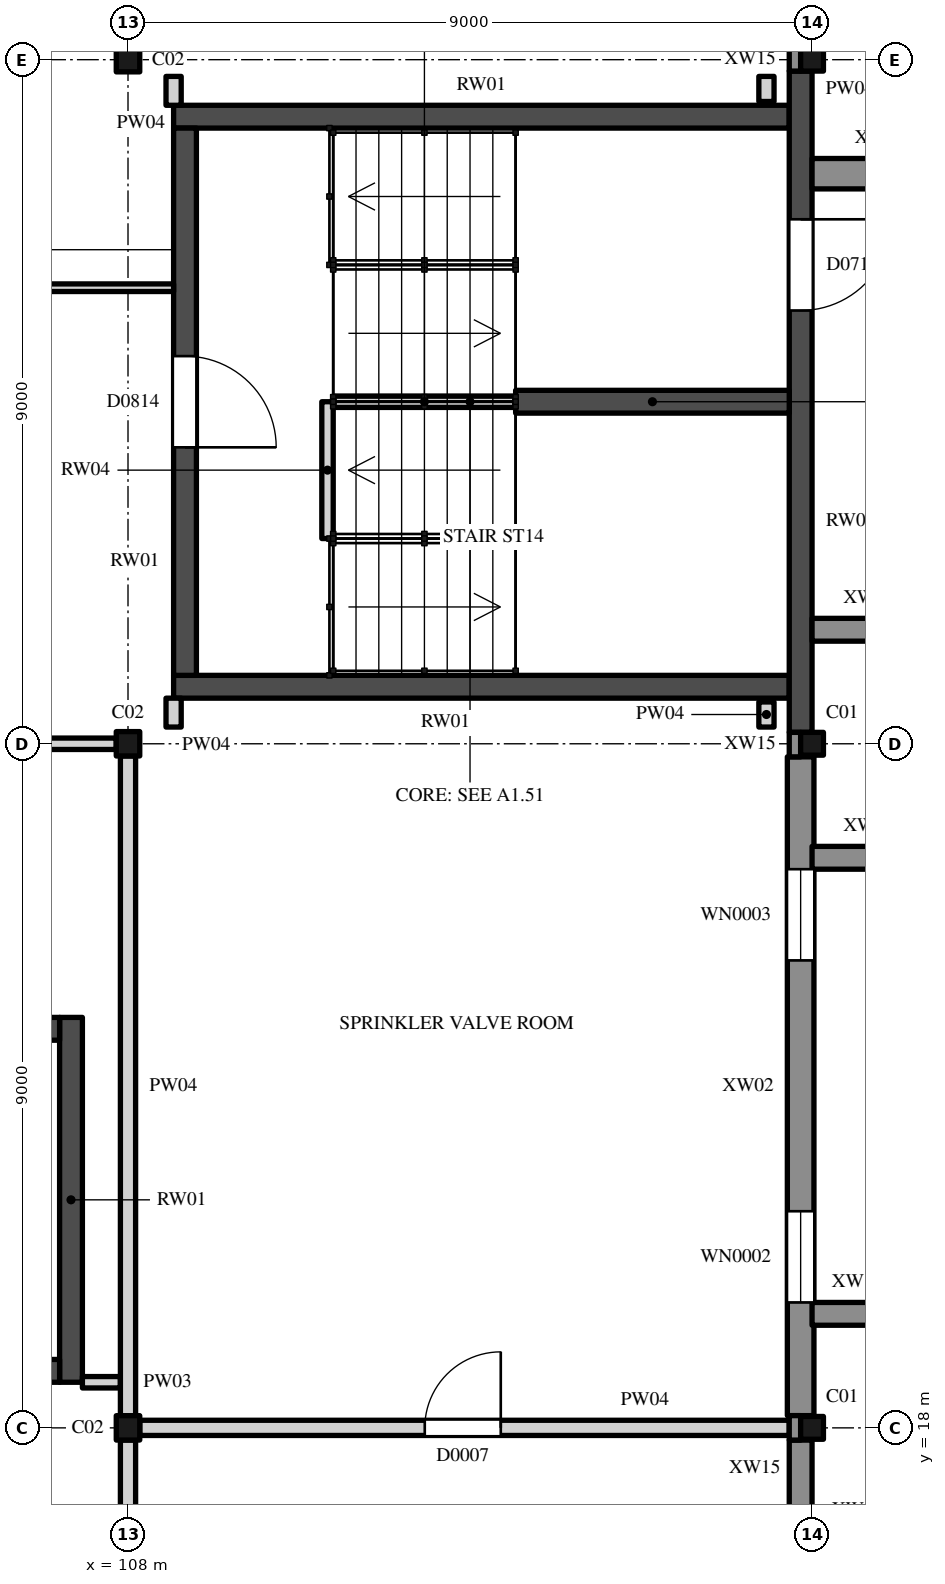
"""IFC4 building model, lengths in metres.
Left out: names, types, materials, properties, quantities, classifications, styles, units other than length and angle.
Written with IfcOpenShell. Run it as: python <this file> out.ifc"""

import sys

from ifc_helpers import new_model, si_unit, direction, frame, frame_2d, origin, origin_2d, place, context, subcontext, project, spatial, polyline, rectangle, hollow_rectangle, i_section, outline, extrude, element, fill, save


model = new_model("IFC4")
c1 = context("Model", 3, precision=1e-05, world=origin(), true_north=direction((0.0, 1.0)))
c2 = subcontext(c1, "Body", "Model", "MODEL_VIEW")
j1 = project(units=[si_unit("LENGTHUNIT", "METRE"), si_unit("PLANEANGLEUNIT", "RADIAN")], contexts=[c1])
p1 = place(None, origin())
s1 = spatial("IfcSite", under=j1, at=p1, CompositionType="ELEMENT")
p2 = place(p1, origin())
s2 = spatial("IfcBuilding", under=s1, at=p2, CompositionType="ELEMENT")
p3 = place(p2, origin())
s3 = spatial("IfcBuildingStorey", under=s2, at=p3, CompositionType="ELEMENT", Elevation=0.0)
p4 = place(p3, frame((108.0, 18.0, 0.0), z_axis=(0.0, 0.0, 1.0), x_axis=(1.0, 0.0, 0.0)))
e1 = element("IfcColumn", 1, at=p4, inside=s3, PredefinedType="COLUMN", context=c2, shape_type="SweptSolid", body=[
    extrude(i_section(OverallWidth=0.309, OverallDepth=0.321, WebThickness=0.014, FlangeThickness=0.022, FilletRadius=0.017, at=origin_2d()), origin(), (0.0, 0.0, 1.0), 6.0),
])
p5 = place(p3, frame((117.0, 18.0, 0.0), z_axis=(0.0, 0.0, 1.0), x_axis=(1.0, 0.0, 0.0)))
e2 = element("IfcColumn", 2, at=p5, inside=s3, PredefinedType="COLUMN", context=c2, shape_type="SweptSolid", body=[
    extrude(hollow_rectangle(XDim=0.3, YDim=0.3, WallThickness=0.012, InnerFilletRadius=0.019, OuterFilletRadius=0.031, at=origin_2d()), origin(), (0.0, 0.0, 1.0), 6.0),
])
p6 = place(p3, frame((108.0, 27.0, 0.0), z_axis=(0.0, 0.0, 1.0), x_axis=(1.0, 0.0, 0.0)))
e3 = element("IfcColumn", 3, at=p6, inside=s3, PredefinedType="COLUMN", context=c2, shape_type="SweptSolid", body=[
    extrude(i_section(OverallWidth=0.309, OverallDepth=0.321, WebThickness=0.014, FlangeThickness=0.022, FilletRadius=0.017, at=origin_2d()), origin(), (0.0, 0.0, 1.0), 6.0),
])
p7 = place(p3, frame((117.0, 27.0, 0.0), z_axis=(0.0, 0.0, 1.0), x_axis=(1.0, 0.0, 0.0)))
e4 = element("IfcColumn", 4, at=p7, inside=s3, PredefinedType="COLUMN", context=c2, shape_type="SweptSolid", body=[
    extrude(hollow_rectangle(XDim=0.3, YDim=0.3, WallThickness=0.012, InnerFilletRadius=0.019, OuterFilletRadius=0.031, at=origin_2d()), origin(), (0.0, 0.0, 1.0), 6.0),
])
p8 = place(p3, frame((108.0, 36.0, 0.0), z_axis=(0.0, 0.0, 1.0), x_axis=(1.0, 0.0, 0.0)))
e5 = element("IfcColumn", 5, at=p8, inside=s3, PredefinedType="COLUMN", context=c2, shape_type="SweptSolid", body=[
    extrude(i_section(OverallWidth=0.309, OverallDepth=0.321, WebThickness=0.014, FlangeThickness=0.022, FilletRadius=0.017, at=origin_2d()), origin(), (0.0, 0.0, 1.0), 6.0),
])
p9 = place(p3, frame((117.0, 36.0, 0.0), z_axis=(0.0, 0.0, 1.0), x_axis=(1.0, 0.0, 0.0)))
e6 = element("IfcColumn", 6, at=p9, inside=s3, PredefinedType="COLUMN", context=c2, shape_type="SweptSolid", body=[
    extrude(hollow_rectangle(XDim=0.3, YDim=0.3, WallThickness=0.012, InnerFilletRadius=0.019, OuterFilletRadius=0.031, at=origin_2d()), origin(), (0.0, 0.0, 1.0), 6.0),
])
for number, where, z_axis, x_axis in (
    (7, (108.6, 27.75, 0.0), (0.0, 0.0, 1.0), (1.0, 0.0, 0.0)),
    (8, (108.6, 35.25, 0.0), (0.0, 0.0, 1.0), (1.0, 0.0, 0.0)),
):
    element("IfcWall", number, at=place(p3, frame(where, z_axis=z_axis, x_axis=x_axis)), inside=s3, PredefinedType="SHEAR", context=c2, shape_type="SweptSolid", body=[
        extrude(rectangle(XDim=8.1, YDim=0.3, at=frame_2d((4.05, 0.0))), origin(), (0.0, 0.0, 1.0), 6.0),
    ])
p10 = place(p3, frame((108.75, 27.9, 0.0), z_axis=(0.0, 0.0, 1.0), x_axis=(0.0, 1.0, 0.0)))
e9 = element("IfcWall", 9, at=p10, inside=s3, PredefinedType="SHEAR", context=c2, shape_type="SweptSolid", body=[
    extrude(rectangle(XDim=7.2, YDim=0.3, at=frame_2d((3.6, 0.0))), origin(), (0.0, 0.0, 1.0), 6.0),
])
p11 = place(p10, frame((3.0, 0.0, 0.0)))
e10 = element("IfcOpeningElement", 10, at=p11, cuts=e9, PredefinedType="OPENING", context=c2, shape_type="SweptSolid", body=[
    extrude(rectangle(XDim=1.2, YDim=2.1, at=frame_2d((0.6, 1.05))), frame((0.0, 0.16, 0.0), z_axis=(0.0, -1.0, 0.0), x_axis=(1.0, 0.0, 0.0)), (0.0, 0.0, 1.0), 0.32),
])
p12 = place(p3, frame((116.85, 27.15, 0.0), z_axis=(0.0, 0.0, 1.0), x_axis=(0.0, 1.0, 0.0)))
e11 = element("IfcWall", 11, at=p12, inside=s3, PredefinedType="SHEAR", context=c2, shape_type="SweptSolid", body=[
    extrude(rectangle(XDim=8.7, YDim=0.3, at=frame_2d((4.35, 0.0))), origin(), (0.0, 0.0, 1.0), 6.0),
])
p13 = place(p12, frame((5.55, 0.0, 0.0)))
e12 = element("IfcOpeningElement", 12, at=p13, cuts=e11, PredefinedType="OPENING", context=c2, shape_type="SweptSolid", body=[
    extrude(rectangle(XDim=1.2, YDim=2.1, at=frame_2d((0.6, 1.05))), frame((0.0, 0.16, 0.0), z_axis=(0.0, -1.0, 0.0), x_axis=(1.0, 0.0, 0.0)), (0.0, 0.0, 1.0), 0.32),
])
p14 = place(p3, frame((113.1, 31.5, 0.0), z_axis=(0.0, 0.0, 1.0), x_axis=(1.0, 0.0, 0.0)))
e13 = element("IfcWall", 13, at=p14, inside=s3, PredefinedType="SHEAR", context=c2, shape_type="SweptSolid", body=[
    extrude(rectangle(XDim=3.6, YDim=0.3, at=frame_2d((1.8, 0.0))), origin(), (0.0, 0.0, 1.0), 6.0),
])
p15 = place(p3, frame((110.625, 29.7, 0.0), z_axis=(0.0, 0.0, 1.0), x_axis=(0.0, 1.0, 0.0)))
e14 = element("IfcWall", 14, at=p15, inside=s3, PredefinedType="STANDARD", context=c2, shape_type="SweptSolid", body=[
    extrude(rectangle(XDim=1.8, YDim=0.15, at=frame_2d((0.9, 0.0))), origin(), (0.0, 0.0, 1.0), 2.8),
])
p16 = place(p3, frame((110.7, 31.5, 0.0), z_axis=(0.0, 0.0, 1.0), x_axis=(1.0, 0.0, 0.0)))
e15 = element("IfcWall", 15, at=p16, inside=s3, PredefinedType="STANDARD", context=c2, shape_type="SweptSolid", body=[
    extrude(outline(polyline([(0.0, 0.0), (2.4, 0.0), (2.4, 1.5), (2.091, 1.5), (0.0, 2.662), (0.0, 0.0)])), frame((0.0, 0.075, 0.0), z_axis=(0.0, -1.0, 0.0), x_axis=(1.0, 0.0, 0.0)), (0.0, 0.0, 1.0), 0.15),
])
p17 = place(p3, frame((107.25, 18.6, -1.5), z_axis=(0.0, 0.0, 1.0), x_axis=(0.0, 1.0, 0.0)))
e16 = element("IfcWall", 16, at=p17, inside=s3, PredefinedType="SHEAR", context=c2, shape_type="SweptSolid", body=[
    extrude(rectangle(XDim=4.8, YDim=0.3, at=frame_2d((2.4, 0.0))), origin(), (0.0, 0.0, 1.0), 7.5),
])
p18 = place(p3, frame((103.65, 18.75, -1.5), z_axis=(0.0, 0.0, 1.0), x_axis=(1.0, 0.0, 0.0)))
e17 = element("IfcWall", 17, at=p18, inside=s3, PredefinedType="SHEAR", context=c2, shape_type="SweptSolid", body=[
    extrude(rectangle(XDim=3.45, YDim=0.3, at=frame_2d((1.725, 0.0))), origin(), (0.0, 0.0, 1.0), 7.5),
])
p19 = place(p18, frame((0.75, 0.0, 1.5)))
e18 = element("IfcOpeningElement", 18, at=p19, cuts=e17, PredefinedType="OPENING", context=c2, shape_type="SweptSolid", body=[
    extrude(rectangle(XDim=2.1, YDim=2.4, at=frame_2d((1.05, 1.2))), frame((0.0, 0.16, 0.0), z_axis=(0.0, -1.0, 0.0), x_axis=(1.0, 0.0, 0.0)), (0.0, 0.0, 1.0), 0.32),
])
p20 = place(p3, frame((103.65, 23.25, -1.5), z_axis=(0.0, 0.0, 1.0), x_axis=(1.0, 0.0, 0.0)))
e19 = element("IfcWall", 19, at=p20, inside=s3, PredefinedType="SHEAR", context=c2, shape_type="SweptSolid", body=[
    extrude(rectangle(XDim=3.45, YDim=0.3, at=frame_2d((1.725, 0.0))), origin(), (0.0, 0.0, 1.0), 7.5),
])
p21 = place(p3, frame((116.85, 9.172, 0.0), z_axis=(0.0, 0.0, 1.0), x_axis=(0.0, 1.0, 0.0)))
e20 = element("IfcWall", 20, at=p21, inside=s3, PredefinedType="SOLIDWALL", context=c2, shape_type="SweptSolid", body=[
    extrude(rectangle(XDim=8.667, YDim=0.3, at=frame_2d((4.333, 0.0))), origin(), (0.0, 0.0, 1.0), 5.292),
])
p22 = place(p21, frame((3.128, 0.0, 0.9)))
e21 = element("IfcOpeningElement", 21, at=p22, cuts=e20, PredefinedType="OPENING", context=c2, shape_type="SweptSolid", body=[
    extrude(rectangle(XDim=2.4, YDim=1.8, at=frame_2d((1.2, 0.9))), frame((0.0, 0.16, 0.0), z_axis=(0.0, -1.0, 0.0), x_axis=(1.0, 0.0, 0.0)), (0.0, 0.0, 1.0), 0.32),
])
p23 = place(p3, frame((116.85, 18.161, 0.0), z_axis=(0.0, 0.0, 1.0), x_axis=(0.0, 1.0, 0.0)))
e22 = element("IfcWall", 22, at=p23, inside=s3, PredefinedType="SOLIDWALL", context=c2, shape_type="SweptSolid", body=[
    extrude(rectangle(XDim=8.667, YDim=0.35, at=frame_2d((4.333, 0.0))), origin(), (0.0, 0.0, 1.0), 5.292),
])
p24 = place(p23, frame((1.489, 0.0, 1.2)))
e23 = element("IfcOpeningElement", 23, at=p24, cuts=e22, PredefinedType="OPENING", context=c2, shape_type="SweptSolid", body=[
    extrude(rectangle(XDim=1.2, YDim=1.5, at=frame_2d((0.6, 0.75))), frame((0.0, 0.185, 0.0), z_axis=(0.0, -1.0, 0.0), x_axis=(1.0, 0.0, 0.0)), (0.0, 0.0, 1.0), 0.37),
])
p25 = place(p23, frame((5.989, 0.0, 1.2)))
e24 = element("IfcOpeningElement", 24, at=p25, cuts=e22, PredefinedType="OPENING", context=c2, shape_type="SweptSolid", body=[
    extrude(rectangle(XDim=1.2, YDim=1.5, at=frame_2d((0.6, 0.75))), frame((0.0, 0.185, 0.0), z_axis=(0.0, -1.0, 0.0), x_axis=(1.0, 0.0, 0.0)), (0.0, 0.0, 1.0), 0.37),
])
p26 = place(p3, frame((116.775, 17.839, 0.0), z_axis=(0.0, 0.0, 1.0), x_axis=(0.0, 1.0, 0.0)))
e25 = element("IfcWall", 25, at=p26, inside=s3, PredefinedType="SOLIDWALL", context=c2, shape_type="SweptSolid", body=[
    extrude(rectangle(XDim=0.322, YDim=0.15, at=frame_2d((0.161, 0.0))), origin(), (0.0, 0.0, 1.0), 5.292),
])
for number, where, z_axis, x_axis in (
    (26, (116.775, 26.828, 0.0), (0.0, 0.0, 1.0), (0.0, 1.0, 0.0)),
    (27, (116.775, 35.85, 0.0), (0.0, 0.0, 1.0), (0.0, 1.0, 0.0)),
):
    element("IfcWall", number, at=place(p3, frame(where, z_axis=z_axis, x_axis=x_axis)), inside=s3, PredefinedType="SOLIDWALL", context=c2, shape_type="SweptSolid", body=[
        extrude(rectangle(XDim=0.322, YDim=0.15, at=frame_2d((0.161, 0.0))), origin(), (0.0, 0.0, 1.0), 6.0),
    ])
p27 = place(p3, frame((117.0, 19.5, 0.0), z_axis=(0.0, 0.0, 1.0), x_axis=(1.0, 0.0, 0.0)))
e28 = element("IfcWall", 28, at=p27, inside=s3, PredefinedType="SOLIDWALL", context=c2, shape_type="SweptSolid", body=[
    extrude(outline(polyline([(0.0, 0.0), (1.2, 0.0), (1.2, 1.2), (0.0, 4.5), (0.0, 0.0)])), frame((0.0, 0.15, 0.0), z_axis=(0.0, -1.0, 0.0), x_axis=(1.0, 0.0, 0.0)), (0.0, 0.0, 1.0), 0.3),
])
p28 = place(p3, frame((117.0, 25.5, 0.0), z_axis=(0.0, 0.0, 1.0), x_axis=(1.0, 0.0, 0.0)))
e29 = element("IfcWall", 29, at=p28, inside=s3, PredefinedType="SOLIDWALL", context=c2, shape_type="SweptSolid", body=[
    extrude(outline(polyline([(0.0, 0.0), (1.5, 0.0), (1.5, 1.2), (0.0, 5.0), (0.0, 0.0)])), frame((0.0, 0.15, 0.0), z_axis=(0.0, -1.0, 0.0), x_axis=(1.0, 0.0, 0.0)), (0.0, 0.0, 1.0), 0.3),
])
p29 = place(p3, frame((117.0, 28.5, 0.0), z_axis=(0.0, 0.0, 1.0), x_axis=(1.0, 0.0, 0.0)))
e30 = element("IfcWall", 30, at=p29, inside=s3, PredefinedType="SOLIDWALL", context=c2, shape_type="SweptSolid", body=[
    extrude(outline(polyline([(0.0, 0.0), (1.5, 0.0), (1.5, 1.2), (0.0, 5.5), (0.0, 0.0)])), frame((0.0, 0.15, 0.0), z_axis=(0.0, -1.0, 0.0), x_axis=(1.0, 0.0, 0.0)), (0.0, 0.0, 1.0), 0.3),
])
p30 = place(p3, frame((117.0, 34.5, 0.0), z_axis=(0.0, 0.0, 1.0), x_axis=(1.0, 0.0, 0.0)))
e31 = element("IfcWall", 31, at=p30, inside=s3, PredefinedType="SOLIDWALL", context=c2, shape_type="SweptSolid", body=[
    extrude(outline(polyline([(0.0, 0.0), (1.8, 0.0), (1.8, 1.2), (0.0, 6.0), (0.0, 0.0)])), frame((0.0, 0.2, 0.0), z_axis=(0.0, -1.0, 0.0), x_axis=(1.0, 0.0, 0.0)), (0.0, 0.0, 1.0), 0.4),
])
p31 = place(p3, frame((108.155, 18.0, 0.0), z_axis=(0.0, 0.0, 1.0), x_axis=(1.0, 0.0, 0.0)))
e32 = element("IfcWall", 32, at=p31, inside=s3, PredefinedType="PARTITIONING", context=c2, shape_type="SweptSolid", body=[
    extrude(rectangle(XDim=8.545, YDim=0.2, at=frame_2d((4.273, 0.0))), origin(), (0.0, 0.0, 1.0), 5.419),
])
p32 = place(p31, frame((3.75, 0.0, 0.0)))
e33 = element("IfcOpeningElement", 33, at=p32, cuts=e32, PredefinedType="OPENING", context=c2, shape_type="SweptSolid", body=[
    extrude(rectangle(XDim=1.0, YDim=2.1, at=frame_2d((0.5, 1.05))), frame((0.0, 0.11, 0.0), z_axis=(0.0, -1.0, 0.0), x_axis=(1.0, 0.0, 0.0)), (0.0, 0.0, 1.0), 0.22),
])
p33 = place(p3, frame((107.4, 18.6, 0.0), z_axis=(0.0, 0.0, 1.0), x_axis=(1.0, 0.0, 0.0)))
e34 = element("IfcWall", 34, at=p33, inside=s3, PredefinedType="PARTITIONING", context=c2, shape_type="SweptSolid", body=[
    extrude(rectangle(XDim=0.5, YDim=0.15, at=frame_2d((0.25, 0.0))), origin(), (0.0, 0.0, 1.0), 5.825),
])
p34 = place(p3, frame((99.155, 27.0, 0.0), z_axis=(0.0, 0.0, 1.0), x_axis=(1.0, 0.0, 0.0)))
e35 = element("IfcWall", 35, at=p34, inside=s3, PredefinedType="PARTITIONING", context=c2, shape_type="SweptSolid", body=[
    extrude(rectangle(XDim=8.691, YDim=0.15, at=frame_2d((4.345, 0.0))), origin(), (0.0, 0.0, 1.0), 5.419),
])
p35 = place(p34, frame((3.75, 0.0, 0.0)))
e36 = element("IfcOpeningElement", 36, at=p35, cuts=e35, PredefinedType="OPENING", context=c2, shape_type="SweptSolid", body=[
    extrude(rectangle(XDim=1.2, YDim=2.4, at=frame_2d((0.6, 1.2))), frame((0.0, 0.085, 0.0), z_axis=(0.0, -1.0, 0.0), x_axis=(1.0, 0.0, 0.0)), (0.0, 0.0, 1.0), 0.17),
])
p36 = place(p3, frame((74.95, 33.0, 0.0), z_axis=(0.0, 0.0, 1.0), x_axis=(1.0, 0.0, 0.0)))
e37 = element("IfcWall", 37, at=p36, inside=s3, PredefinedType="PARTITIONING", context=c2, shape_type="SweptSolid", body=[
    extrude(rectangle(XDim=33.65, YDim=0.1, at=frame_2d((16.825, 0.0))), origin(), (0.0, 0.0, 1.0), 5.422),
])
p37 = place(p36, frame((14.5, 0.0, 0.0)))
e38 = element("IfcOpeningElement", 38, at=p37, cuts=e37, PredefinedType="OPENING", context=c2, shape_type="SweptSolid", body=[
    extrude(rectangle(XDim=1.1, YDim=2.1, at=frame_2d((0.55, 1.05))), frame((0.0, 0.06, 0.0), z_axis=(0.0, -1.0, 0.0), x_axis=(1.0, 0.0, 0.0)), (0.0, 0.0, 1.0), 0.12),
])
p38 = place(p36, frame((28.1, 0.0, 0.0)))
e39 = element("IfcOpeningElement", 39, at=p38, cuts=e37, PredefinedType="OPENING", context=c2, shape_type="SweptSolid", body=[
    extrude(rectangle(XDim=0.9, YDim=2.1, at=frame_2d((0.45, 1.05))), frame((0.0, 0.06, 0.0), z_axis=(0.0, -1.0, 0.0), x_axis=(1.0, 0.0, 0.0)), (0.0, 0.0, 1.0), 0.12),
])
p39 = place(p3, frame((108.0, 9.16, 0.0), z_axis=(0.0, 0.0, 1.0), x_axis=(0.0, 1.0, 0.0)))
e40 = element("IfcWall", 40, at=p39, inside=s3, PredefinedType="PARTITIONING", context=c2, shape_type="SweptSolid", body=[
    extrude(rectangle(XDim=8.679, YDim=0.2, at=frame_2d((4.34, 0.0))), origin(), (0.0, 0.0, 1.0), 5.292),
])
p40 = place(p39, frame((3.75, 0.0, 0.0)))
e41 = element("IfcOpeningElement", 41, at=p40, cuts=e40, PredefinedType="OPENING", context=c2, shape_type="SweptSolid", body=[
    extrude(rectangle(XDim=1.2, YDim=2.4, at=frame_2d((0.6, 1.2))), frame((0.0, 0.11, 0.0), z_axis=(0.0, -1.0, 0.0), x_axis=(1.0, 0.0, 0.0)), (0.0, 0.0, 1.0), 0.22),
])
p41 = place(p3, frame((108.0, 18.16, 0.0), z_axis=(0.0, 0.0, 1.0), x_axis=(0.0, 1.0, 0.0)))
e42 = element("IfcWall", 42, at=p41, inside=s3, PredefinedType="PARTITIONING", context=c2, shape_type="SweptSolid", body=[
    extrude(rectangle(XDim=8.679, YDim=0.2, at=frame_2d((4.34, 0.0))), origin(), (0.0, 0.0, 1.0), 5.292),
])
for number, where, z_axis, x_axis in (
    (43, (108.6, 27.22, 0.0), (0.0, 0.0, 1.0), (0.0, 1.0, 0.0)),
    (44, (108.6, 35.4, 0.0), (0.0, 0.0, 1.0), (0.0, 1.0, 0.0)),
):
    element("IfcWall", number, at=place(p3, frame(where, z_axis=z_axis, x_axis=x_axis)), inside=s3, PredefinedType="PARTITIONING", context=c2, shape_type="SweptSolid", body=[
        extrude(rectangle(XDim=0.38, YDim=0.2, at=frame_2d((0.19, 0.0))), origin(), (0.0, 0.0, 1.0), 5.825),
    ])
for number, where, z_axis, x_axis in (
    (45, (116.4, 27.22, 0.0), (0.0, 0.0, 1.0), (0.0, 1.0, 0.0)),
    (46, (116.4, 35.45, 0.0), (0.0, 0.0, 1.0), (0.0, 1.0, 0.0)),
):
    element("IfcWall", number, at=place(p3, frame(where, z_axis=z_axis, x_axis=x_axis)), inside=s3, PredefinedType="PARTITIONING", context=c2, shape_type="SweptSolid", body=[
        extrude(rectangle(XDim=0.33, YDim=0.2, at=frame_2d((0.165, 0.0))), origin(), (0.0, 0.0, 1.0), 5.825),
    ])
p42 = place(p11, origin())
e47 = element("IfcDoor", 47, at=p42, inside=s3, OperationType="SINGLE_SWING_LEFT", PredefinedType="DOOR", context=c2, shape_type="SweptSolid", body=[
    extrude(rectangle(XDim=1.2, YDim=2.1, at=frame_2d((0.6, 1.05))), frame((0.0, 0.025, 0.0), z_axis=(0.0, -1.0, 0.0), x_axis=(1.0, 0.0, 0.0)), (0.0, 0.0, 1.0), 0.05),
])
fill(e10, e47)
p43 = place(p13, frame((1.2, 0.0, 0.0), z_axis=(0.0, 0.0, 1.0), x_axis=(-1.0, 0.0, 0.0)))
e48 = element("IfcDoor", 48, at=p43, inside=s3, OperationType="SINGLE_SWING_RIGHT", PredefinedType="DOOR", context=c2, shape_type="SweptSolid", body=[
    extrude(rectangle(XDim=1.2, YDim=2.1, at=frame_2d((0.6, 1.05))), frame((0.0, 0.025, 0.0), z_axis=(0.0, -1.0, 0.0), x_axis=(1.0, 0.0, 0.0)), (0.0, 0.0, 1.0), 0.05),
])
fill(e12, e48)
p44 = place(p24, origin())
e49 = element("IfcWindow", 49, at=p44, inside=s3, PartitioningType="SINGLE_PANEL", PredefinedType="WINDOW", context=c2, shape_type="SweptSolid", body=[
    extrude(rectangle(XDim=1.2, YDim=1.5, at=frame_2d((0.6, 0.75))), frame((0.0, 0.03, 0.0), z_axis=(0.0, -1.0, 0.0), x_axis=(1.0, 0.0, 0.0)), (0.0, 0.0, 1.0), 0.06),
])
fill(e23, e49)
p45 = place(p25, origin())
e50 = element("IfcWindow", 50, at=p45, inside=s3, PartitioningType="SINGLE_PANEL", PredefinedType="WINDOW", context=c2, shape_type="SweptSolid", body=[
    extrude(rectangle(XDim=1.2, YDim=1.5, at=frame_2d((0.6, 0.75))), frame((0.0, 0.03, 0.0), z_axis=(0.0, -1.0, 0.0), x_axis=(1.0, 0.0, 0.0)), (0.0, 0.0, 1.0), 0.06),
])
fill(e24, e50)
p46 = place(p32, origin())
e51 = element("IfcDoor", 51, at=p46, inside=s3, OperationType="SINGLE_SWING_LEFT", PredefinedType="DOOR", context=c2, shape_type="SweptSolid", body=[
    extrude(rectangle(XDim=1.0, YDim=2.1, at=frame_2d((0.5, 1.05))), frame((0.0, 0.025, 0.0), z_axis=(0.0, -1.0, 0.0), x_axis=(1.0, 0.0, 0.0)), (0.0, 0.0, 1.0), 0.05),
])
fill(e33, e51)
save(model, sys.argv[1])
